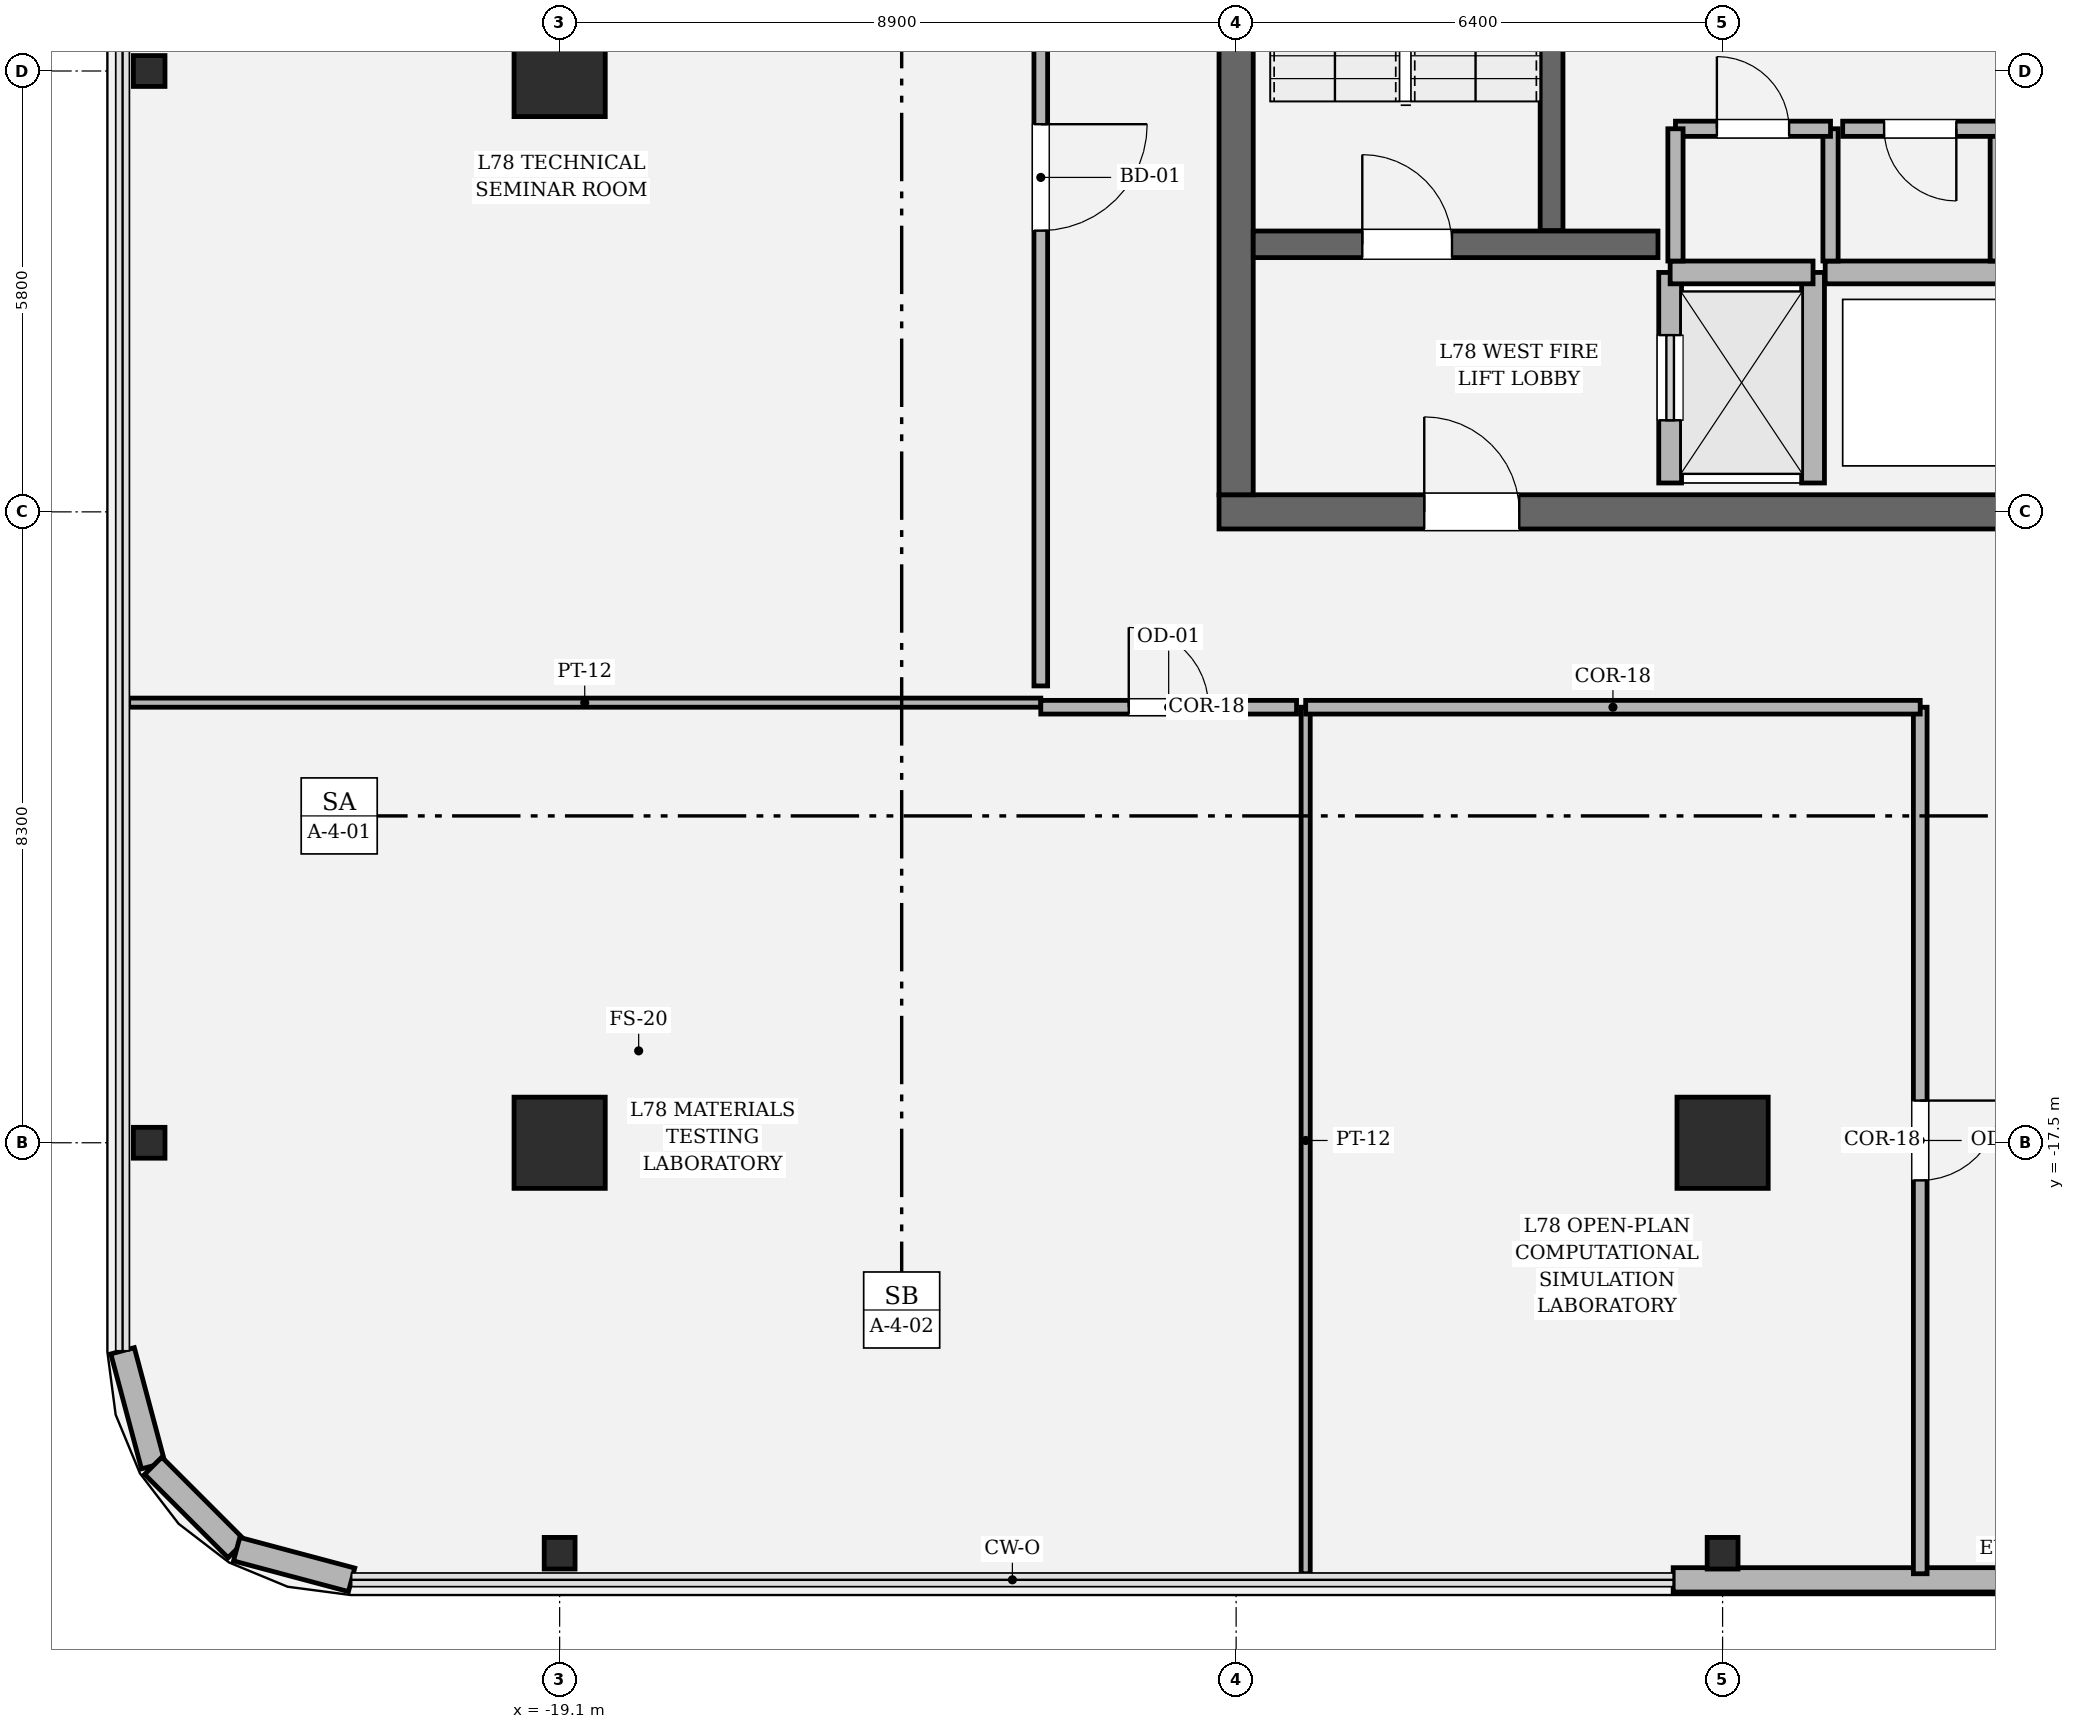
"""IFC4 building model, lengths in metres.
Left out: names, types, materials, properties, quantities, classifications, styles, units other than length and angle.
Written with IfcOpenShell. Run it as: python <this file> out.ifc"""

import sys

from ifc_helpers import new_model, si_unit, direction, frame, frame_2d, origin, origin_2d, place, context, subcontext, project, spatial, rectangle, hollow_rectangle, i_section, extrude, element, fill, save


model = new_model("IFC4")
c1 = context("Model", 3, precision=1e-05, world=origin(), true_north=direction((0.0, 1.0)))
c2 = subcontext(c1, "Body", "Model", "MODEL_VIEW")
j1 = project(units=[si_unit("LENGTHUNIT", "METRE"), si_unit("PLANEANGLEUNIT", "RADIAN")], contexts=[c1])
p1 = place(None, origin())
s1 = spatial("IfcSite", under=j1, at=p1, CompositionType="ELEMENT")
p2 = place(p1, origin())
s2 = spatial("IfcBuilding", under=s1, at=p2, CompositionType="ELEMENT")
p3 = place(p2, frame((0.0, 0.0, 330.0)))
s3 = spatial("IfcBuildingStorey", under=s2, at=p3, CompositionType="ELEMENT", Elevation=330.0)
p4 = place(p3, frame((10.425, -9.2, 0.0), z_axis=(0.0, 0.0, 1.0), x_axis=(-1.0, 0.0, 0.0)))
e1 = element("IfcWall", 1, at=p4, inside=s3, PredefinedType="SHEAR", context=c2, shape_type="SweptSolid", body=[
    extrude(rectangle(XDim=20.85, YDim=0.45, at=frame_2d((10.425, 0.0))), origin(), (0.0, 0.0, 1.0), 4.2),
])
p5 = place(p4, frame((2.7, 0.0, 0.0)))
e2 = element("IfcOpeningElement", 2, at=p5, cuts=e1, PredefinedType="OPENING", context=c2, shape_type="SweptSolid", body=[
    extrude(rectangle(XDim=1.25, YDim=2.25, at=frame_2d((0.625, 1.125))), frame((0.0, 0.235, 0.0), z_axis=(0.0, -1.0, 0.0), x_axis=(1.0, 0.0, 0.0)), (0.0, 0.0, 1.0), 0.47),
])
p6 = place(p4, frame((16.9, 0.0, 0.0)))
e3 = element("IfcOpeningElement", 3, at=p6, cuts=e1, PredefinedType="OPENING", context=c2, shape_type="SweptSolid", body=[
    extrude(rectangle(XDim=1.25, YDim=2.25, at=frame_2d((0.625, 1.125))), frame((0.0, 0.235, 0.0), z_axis=(0.0, -1.0, 0.0), x_axis=(1.0, 0.0, 0.0)), (0.0, 0.0, 1.0), 0.47),
])
p7 = place(p3, frame((-10.2, -8.975, 0.0), z_axis=(0.0, 0.0, 1.0), x_axis=(0.0, 1.0, 0.0)))
e4 = element("IfcWall", 4, at=p7, inside=s3, PredefinedType="SHEAR", context=c2, shape_type="SweptSolid", body=[
    extrude(rectangle(XDim=17.95, YDim=0.45, at=frame_2d((8.975, 0.0))), origin(), (0.0, 0.0, 1.0), 4.2),
])
p8 = place(p7, frame((12.765, 0.0, 0.0)))
e5 = element("IfcOpeningElement", 5, at=p8, cuts=e4, PredefinedType="OPENING", context=c2, shape_type="SweptSolid", body=[
    extrude(rectangle(XDim=1.18, YDim=2.2, at=frame_2d((0.59, 1.1))), frame((0.0, 0.235, 0.0), z_axis=(0.0, -1.0, 0.0), x_axis=(1.0, 0.0, 0.0)), (0.0, 0.0, 1.0), 0.47),
])
p9 = place(p3, frame((-6.05, -5.5, 0.0), z_axis=(0.0, 0.0, 1.0), x_axis=(0.0, 1.0, 0.0)))
e6 = element("IfcWall", 6, at=p9, inside=s3, PredefinedType="SOLIDWALL", context=c2, shape_type="SweptSolid", body=[
    extrude(rectangle(XDim=8.95, YDim=0.3, at=frame_2d((4.475, 0.0))), origin(), (0.0, 0.0, 1.0), 4.2),
])
p10 = place(p3, frame((-9.975, -5.68, 0.0), z_axis=(0.0, 0.0, 1.0), x_axis=(1.0, 0.0, 0.0)))
e7 = element("IfcWall", 7, at=p10, inside=s3, PredefinedType="SOLIDWALL", context=c2, shape_type="SweptSolid", body=[
    extrude(rectangle(XDim=5.325, YDim=0.35, at=frame_2d((2.663, 0.0))), origin(), (0.0, 0.0, 1.0), 4.2),
])
p11 = place(p10, frame((1.435, 0.0, 0.0)))
e8 = element("IfcOpeningElement", 8, at=p11, cuts=e7, PredefinedType="OPENING", context=c2, shape_type="SweptSolid", body=[
    extrude(rectangle(XDim=1.18, YDim=2.2, at=frame_2d((0.59, 1.1))), frame((0.0, 0.185, 0.0), z_axis=(0.0, -1.0, 0.0), x_axis=(1.0, 0.0, 0.0)), (0.0, 0.0, 1.0), 0.37),
])
for number, where, z_axis, x_axis in (
    (9, (-19.1, -17.5, 0.0), (0.0, 0.0, 1.0), (1.0, 0.0, 0.0)),
    (10, (-3.8, -17.5, 0.0), (0.0, 0.0, 1.0), (1.0, 0.0, 0.0)),
    (11, (-19.1, -3.4, 0.0), (0.0, 0.0, 1.0), (1.0, 0.0, 0.0)),
):
    element("IfcColumn", number, at=place(p3, frame(where, z_axis=z_axis, x_axis=x_axis)), inside=s3, PredefinedType="COLUMN", context=c2, shape_type="SweptSolid", body=[
        extrude(hollow_rectangle(XDim=1.2, YDim=1.2, WallThickness=0.035, at=origin_2d()), origin(), (0.0, 0.0, 1.0), 4.2),
    ])
for number, where, z_axis, x_axis in (
    (12, (-19.1, -22.9, 0.0), (0.0, 0.0, 1.0), (1.0, 0.0, 0.0)),
    (13, (-3.8, -22.9, 0.0), (0.0, 0.0, 1.0), (1.0, 0.0, 0.0)),
    (14, (-24.5, -17.5, 0.0), (0.0, 0.0, 1.0), (0.0, 1.0, 0.0)),
    (15, (-24.5, -3.4, 0.0), (0.0, 0.0, 1.0), (0.0, 1.0, 0.0)),
):
    element("IfcColumn", number, at=place(p3, frame(where, z_axis=z_axis, x_axis=x_axis)), inside=s3, PredefinedType="COLUMN", context=c2, shape_type="SweptSolid", body=[
        extrude(i_section(OverallWidth=0.406, OverallDepth=0.416, WebThickness=0.029, FlangeThickness=0.048, FilletRadius=0.018, at=origin_2d()), origin(), (0.0, 0.0, 1.0), 4.198),
    ])
p12 = place(p3, frame((-4.45, -23.25, 0.0), z_axis=(0.0, 0.0, 1.0), x_axis=(1.0, 0.0, 0.0)))
e16 = element("IfcWall", 16, at=p12, inside=s3, PredefinedType="SOLIDWALL", context=c2, shape_type="SweptSolid", body=[
    extrude(rectangle(XDim=8.9, YDim=0.32, at=frame_2d((4.45, 0.0))), origin(), (0.0, 0.0, 1.0), 2.614),
])
p13 = place(p3, frame((-24.85, -20.237, 0.0), z_axis=(0.0, 0.0, 1.0), x_axis=(0.257847112249, -0.966185730957, 0.0)))
e17 = element("IfcWall", 17, at=p13, inside=s3, PredefinedType="SOLIDWALL", context=c2, shape_type="SweptSolid", body=[
    extrude(rectangle(XDim=1.565, YDim=0.32, at=frame_2d((0.783, 0.0))), origin(), (0.0, 0.0, 1.0), 3.94),
])
p14 = place(p3, frame((-24.447, -21.749, 0.0), z_axis=(0.0, 0.0, 1.0), x_axis=(0.707028130747, -0.707185422879, 0.0)))
e18 = element("IfcWall", 18, at=p14, inside=s3, PredefinedType="SOLIDWALL", context=c2, shape_type="SweptSolid", body=[
    extrude(rectangle(XDim=1.552, YDim=0.32, at=frame_2d((0.776, 0.0))), origin(), (0.0, 0.0, 1.0), 3.94),
])
p15 = place(p3, frame((-23.349, -22.847, 0.0), z_axis=(0.0, 0.0, 1.0), x_axis=(0.966224582397, -0.257701486942, 0.0)))
e19 = element("IfcWall", 19, at=p15, inside=s3, PredefinedType="SOLIDWALL", context=c2, shape_type="SweptSolid", body=[
    extrude(rectangle(XDim=1.565, YDim=0.32, at=frame_2d((0.783, 0.0))), origin(), (0.0, 0.0, 1.0), 3.94),
])
p16 = place(p3, frame((-4.49, -8.82, 0.0), z_axis=(0.0, 0.0, 1.0), x_axis=(0.0, 1.0, 0.0)))
e20 = element("IfcWall", 20, at=p16, inside=s3, PredefinedType="SOLIDWALL", context=c2, shape_type="SweptSolid", body=[
    extrude(rectangle(XDim=2.77, YDim=0.3, at=frame_2d((1.385, 0.0))), origin(), (0.0, 0.0, 1.0), 3.94),
])
p17 = place(p16, frame((0.825, 0.0, 0.0)))
e21 = element("IfcOpeningElement", 21, at=p17, cuts=e20, PredefinedType="OPENING", context=c2, shape_type="SweptSolid", body=[
    extrude(rectangle(XDim=1.12, YDim=2.25, at=frame_2d((0.56, 1.125))), frame((0.0, 0.16, 0.0), z_axis=(0.0, -1.0, 0.0), x_axis=(1.0, 0.0, 0.0)), (0.0, 0.0, 1.0), 0.32),
])
p18 = place(p3, frame((-2.61, -8.82, 0.0), z_axis=(0.0, 0.0, 1.0), x_axis=(0.0, 1.0, 0.0)))
e22 = element("IfcWall", 22, at=p18, inside=s3, PredefinedType="SOLIDWALL", context=c2, shape_type="SweptSolid", body=[
    extrude(rectangle(XDim=2.77, YDim=0.3, at=frame_2d((1.385, 0.0))), origin(), (0.0, 0.0, 1.0), 3.94),
])
p19 = place(p3, frame((-4.49, -6.05, 0.0), z_axis=(0.0, 0.0, 1.0), x_axis=(1.0, 0.0, 0.0)))
e23 = element("IfcWall", 23, at=p19, inside=s3, PredefinedType="SOLIDWALL", context=c2, shape_type="SweptSolid", body=[
    extrude(rectangle(XDim=1.88, YDim=0.3, at=frame_2d((0.94, 0.0))), origin(), (0.0, 0.0, 1.0), 3.94),
])
p20 = place(p3, frame((-2.45, -6.05, 0.0), z_axis=(0.0, 0.0, 1.0), x_axis=(1.0, 0.0, 0.0)))
e24 = element("IfcWall", 24, at=p20, inside=s3, PredefinedType="SOLIDWALL", context=c2, shape_type="SweptSolid", body=[
    extrude(rectangle(XDim=4.9, YDim=0.3, at=frame_2d((2.45, 0.0))), origin(), (0.0, 0.0, 1.0), 3.94),
])
p21 = place(p3, frame((-2.38, -5.9, 0.0), z_axis=(0.0, 0.0, 1.0), x_axis=(0.0, 1.0, 0.0)))
e25 = element("IfcWall", 25, at=p21, inside=s3, PredefinedType="SOLIDWALL", context=c2, shape_type="SweptSolid", body=[
    extrude(rectangle(XDim=1.74, YDim=0.2, at=frame_2d((0.87, 0.0))), origin(), (0.0, 0.0, 1.0), 3.94),
])
p22 = place(p3, frame((-2.38, -4.16, 0.0), z_axis=(0.0, 0.0, 1.0), x_axis=(-1.0, 0.0, 0.0)))
e26 = element("IfcWall", 26, at=p22, inside=s3, PredefinedType="SOLIDWALL", context=c2, shape_type="SweptSolid", body=[
    extrude(rectangle(XDim=2.04, YDim=0.2, at=frame_2d((1.02, 0.0))), origin(), (0.0, 0.0, 1.0), 3.94),
])
p23 = place(p22, frame((0.545, 0.0, 0.0)))
e27 = element("IfcOpeningElement", 27, at=p23, cuts=e26, PredefinedType="OPENING", context=c2, shape_type="SweptSolid", body=[
    extrude(rectangle(XDim=0.95, YDim=2.15, at=frame_2d((0.475, 1.075))), frame((0.0, 0.11, 0.0), z_axis=(0.0, -1.0, 0.0), x_axis=(1.0, 0.0, 0.0)), (0.0, 0.0, 1.0), 0.22),
])
for number, where, z_axis, x_axis in (
    (28, (-4.42, -4.16, 0.0), (0.0, 0.0, 1.0), (0.0, -1.0, 0.0)),
    (29, (-0.18, -5.9, 0.0), (0.0, 0.0, 1.0), (0.0, 1.0, 0.0)),
):
    element("IfcWall", number, at=place(p3, frame(where, z_axis=z_axis, x_axis=x_axis)), inside=s3, PredefinedType="SOLIDWALL", context=c2, shape_type="SweptSolid", body=[
        extrude(rectangle(XDim=1.74, YDim=0.2, at=frame_2d((0.87, 0.0))), origin(), (0.0, 0.0, 1.0), 3.94),
    ])
p24 = place(p3, frame((-0.18, -4.16, 0.0), z_axis=(0.0, 0.0, 1.0), x_axis=(-1.0, 0.0, 0.0)))
e30 = element("IfcWall", 30, at=p24, inside=s3, PredefinedType="SOLIDWALL", context=c2, shape_type="SweptSolid", body=[
    extrude(rectangle(XDim=2.04, YDim=0.2, at=frame_2d((1.02, 0.0))), origin(), (0.0, 0.0, 1.0), 3.94),
])
p25 = place(p24, frame((0.545, 0.0, 0.0)))
e31 = element("IfcOpeningElement", 31, at=p25, cuts=e30, PredefinedType="OPENING", context=c2, shape_type="SweptSolid", body=[
    extrude(rectangle(XDim=0.95, YDim=2.15, at=frame_2d((0.475, 1.075))), frame((0.0, 0.11, 0.0), z_axis=(0.0, -1.0, 0.0), x_axis=(1.0, 0.0, 0.0)), (0.0, 0.0, 1.0), 0.22),
])
p26 = place(p3, frame((-1.2, -11.77, 0.0), z_axis=(0.0, 0.0, 1.0), x_axis=(0.0, -1.0, 0.0)))
e32 = element("IfcWall", 32, at=p26, inside=s3, PredefinedType="PARTITIONING", context=c2, shape_type="SweptSolid", body=[
    extrude(rectangle(XDim=11.4, YDim=0.18, at=frame_2d((5.7, 0.0))), origin(), (0.0, 0.0, 1.0), 2.614),
])
p27 = place(p26, frame((5.175, 0.0, 0.0)))
e33 = element("IfcOpeningElement", 33, at=p27, cuts=e32, PredefinedType="OPENING", context=c2, shape_type="SweptSolid", body=[
    extrude(rectangle(XDim=1.05, YDim=2.2, at=frame_2d((0.525, 1.1))), frame((0.0, 0.1, 0.0), z_axis=(0.0, -1.0, 0.0), x_axis=(1.0, 0.0, 0.0)), (0.0, 0.0, 1.0), 0.2),
])
p28 = place(p3, frame((-9.285, -23.17, 0.0), z_axis=(0.0, 0.0, 1.0), x_axis=(0.0, 1.0, 0.0)))
e34 = element("IfcWall", 34, at=p28, inside=s3, PredefinedType="PARTITIONING", context=c2, shape_type="SweptSolid", body=[
    extrude(rectangle(XDim=11.4, YDim=0.12, at=frame_2d((5.7, 0.0))), origin(), (0.0, 0.0, 1.0), 2.614),
])
p29 = place(p3, frame((-9.285, -11.77, 0.0), z_axis=(0.0, 0.0, 1.0), x_axis=(1.0, 0.0, 0.0)))
e35 = element("IfcWall", 35, at=p29, inside=s3, PredefinedType="PARTITIONING", context=c2, shape_type="SweptSolid", body=[
    extrude(rectangle(XDim=8.085, YDim=0.18, at=frame_2d((4.042, 0.0))), origin(), (0.0, 0.0, 1.0), 2.614),
])
p30 = place(p3, frame((-24.77, -11.71, 0.0), z_axis=(0.0, 0.0, 1.0), x_axis=(1.0, 0.0, 0.0)))
e36 = element("IfcWall", 36, at=p30, inside=s3, PredefinedType="PARTITIONING", context=c2, shape_type="SweptSolid", body=[
    extrude(rectangle(XDim=12.0, YDim=0.12, at=frame_2d((6.0, 0.0))), origin(), (0.0, 0.0, 1.0), 2.614),
])
p31 = place(p3, frame((-12.77, -11.77, 0.0), z_axis=(0.0, 0.0, 1.0), x_axis=(1.0, 0.0, 0.0)))
e37 = element("IfcWall", 37, at=p31, inside=s3, PredefinedType="PARTITIONING", context=c2, shape_type="SweptSolid", body=[
    extrude(rectangle(XDim=3.365, YDim=0.18, at=frame_2d((1.683, 0.0))), origin(), (0.0, 0.0, 1.0), 2.614),
])
p32 = place(p31, frame((1.157, 0.0, 0.0)))
e38 = element("IfcOpeningElement", 38, at=p32, cuts=e37, PredefinedType="OPENING", context=c2, shape_type="SweptSolid", body=[
    extrude(rectangle(XDim=1.05, YDim=2.2, at=frame_2d((0.525, 1.1))), frame((0.0, 0.1, 0.0), z_axis=(0.0, -1.0, 0.0), x_axis=(1.0, 0.0, 0.0)), (0.0, 0.0, 1.0), 0.2),
])
p33 = place(p3, frame((-12.77, 1.89, 0.0), z_axis=(0.0, 0.0, 1.0), x_axis=(0.0, -1.0, 0.0)))
e39 = element("IfcWall", 39, at=p33, inside=s3, PredefinedType="PARTITIONING", context=c2, shape_type="SweptSolid", body=[
    extrude(rectangle(XDim=13.38, YDim=0.18, at=frame_2d((6.69, 0.0))), origin(), (0.0, 0.0, 1.0), 2.614),
])
p34 = place(p33, frame((5.99, 0.0, 0.0)))
e40 = element("IfcOpeningElement", 40, at=p34, cuts=e39, PredefinedType="OPENING", context=c2, shape_type="SweptSolid", body=[
    extrude(rectangle(XDim=1.4, YDim=2.25, at=frame_2d((0.7, 1.125))), frame((0.0, 0.1, 0.0), z_axis=(0.0, -1.0, 0.0), x_axis=(1.0, 0.0, 0.0)), (0.0, 0.0, 1.0), 0.2),
])
p35 = place(p11, origin())
e41 = element("IfcDoor", 41, at=p35, inside=s3, OperationType="SINGLE_SWING_LEFT", PredefinedType="DOOR", context=c2, shape_type="SweptSolid", body=[
    extrude(rectangle(XDim=1.18, YDim=2.2, at=frame_2d((0.59, 1.1))), frame((0.0, 0.025, 0.0), z_axis=(0.0, -1.0, 0.0), x_axis=(1.0, 0.0, 0.0)), (0.0, 0.0, 1.0), 0.05),
])
fill(e8, e41)
p36 = place(p6, origin())
e42 = element("IfcDoor", 42, at=p36, inside=s3, OperationType="SINGLE_SWING_RIGHT", PredefinedType="DOOR", context=c2, shape_type="SweptSolid", body=[
    extrude(rectangle(XDim=1.25, YDim=2.25, at=frame_2d((0.625, 1.125))), frame((0.0, 0.025, 0.0), z_axis=(0.0, -1.0, 0.0), x_axis=(1.0, 0.0, 0.0)), (0.0, 0.0, 1.0), 0.05),
])
fill(e3, e42)
p37 = place(p17, origin())
e43 = element("IfcDoor", 43, at=p37, inside=s3, OperationType="SLIDING_TO_LEFT", PredefinedType="DOOR", context=c2, shape_type="SweptSolid", body=[
    extrude(rectangle(XDim=1.12, YDim=2.25, at=frame_2d((0.56, 1.125))), frame((0.0, 0.025, 0.0), z_axis=(0.0, -1.0, 0.0), x_axis=(1.0, 0.0, 0.0)), (0.0, 0.0, 1.0), 0.05),
])
fill(e21, e43)
p38 = place(p23, origin())
e44 = element("IfcDoor", 44, at=p38, inside=s3, OperationType="SINGLE_SWING_RIGHT", PredefinedType="DOOR", context=c2, shape_type="SweptSolid", body=[
    extrude(rectangle(XDim=0.95, YDim=2.15, at=frame_2d((0.475, 1.075))), frame((0.0, 0.025, 0.0), z_axis=(0.0, -1.0, 0.0), x_axis=(1.0, 0.0, 0.0)), (0.0, 0.0, 1.0), 0.05),
])
fill(e27, e44)
p39 = place(p25, origin())
e45 = element("IfcDoor", 45, at=p39, inside=s3, OperationType="SINGLE_SWING_LEFT", PredefinedType="DOOR", context=c2, shape_type="SweptSolid", body=[
    extrude(rectangle(XDim=0.95, YDim=2.15, at=frame_2d((0.475, 1.075))), frame((0.0, 0.025, 0.0), z_axis=(0.0, -1.0, 0.0), x_axis=(1.0, 0.0, 0.0)), (0.0, 0.0, 1.0), 0.05),
])
fill(e31, e45)
p40 = place(p27, origin())
e46 = element("IfcDoor", 46, at=p40, inside=s3, OperationType="SINGLE_SWING_LEFT", PredefinedType="DOOR", context=c2, shape_type="SweptSolid", body=[
    extrude(rectangle(XDim=1.05, YDim=2.2, at=frame_2d((0.525, 1.1))), frame((0.0, 0.025, 0.0), z_axis=(0.0, -1.0, 0.0), x_axis=(1.0, 0.0, 0.0)), (0.0, 0.0, 1.0), 0.05),
])
fill(e33, e46)
p41 = place(p32, origin())
e47 = element("IfcDoor", 47, at=p41, inside=s3, OperationType="SINGLE_SWING_LEFT", PredefinedType="DOOR", context=c2, shape_type="SweptSolid", body=[
    extrude(rectangle(XDim=1.05, YDim=2.2, at=frame_2d((0.525, 1.1))), frame((0.0, 0.025, 0.0), z_axis=(0.0, -1.0, 0.0), x_axis=(1.0, 0.0, 0.0)), (0.0, 0.0, 1.0), 0.05),
])
fill(e38, e47)
p42 = place(p34, origin())
e48 = element("IfcDoor", 48, at=p42, inside=s3, OperationType="SINGLE_SWING_LEFT", PredefinedType="DOOR", context=c2, shape_type="SweptSolid", body=[
    extrude(rectangle(XDim=1.4, YDim=2.25, at=frame_2d((0.7, 1.125))), frame((0.0, 0.025, 0.0), z_axis=(0.0, -1.0, 0.0), x_axis=(1.0, 0.0, 0.0)), (0.0, 0.0, 1.0), 0.05),
])
fill(e40, e48)
save(model, sys.argv[1])
